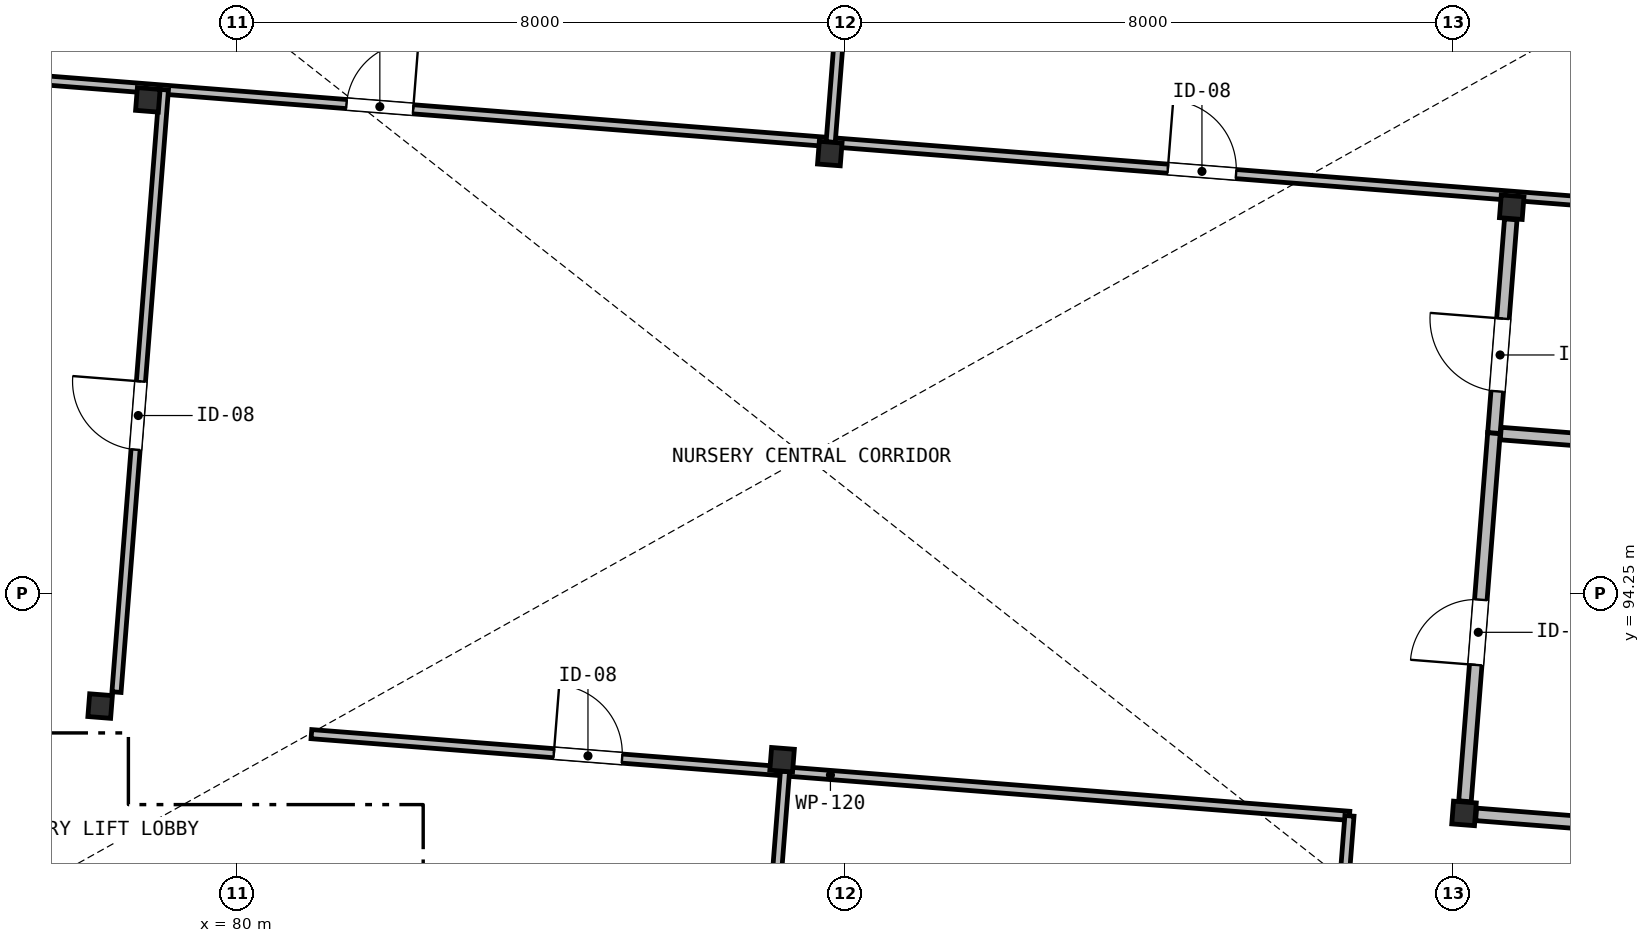
"""IFC4 building model, lengths in metres.
Left out: names, types, materials, properties, quantities, classifications, styles, units other than length and angle.
Written with IfcOpenShell. Run it as: python <this file> out.ifc"""

import sys

from ifc_helpers import new_model, si_unit, direction, frame, frame_2d, origin, origin_2d, place, context, subcontext, project, spatial, rectangle, hollow_rectangle, extrude, element, fill, save


model = new_model("IFC4")
c1 = context("Model", 3, precision=1e-05, world=origin(), true_north=direction((0.0, 1.0)))
c2 = subcontext(c1, "Body", "Model", "MODEL_VIEW")
j1 = project(units=[si_unit("LENGTHUNIT", "METRE"), si_unit("PLANEANGLEUNIT", "RADIAN")], contexts=[c1])
p1 = place(None, origin())
s1 = spatial("IfcSite", under=j1, at=p1, CompositionType="ELEMENT")
p2 = place(p1, origin())
s2 = spatial("IfcBuilding", under=s1, at=p2, CompositionType="ELEMENT")
p3 = place(p2, origin())
s3 = spatial("IfcBuildingStorey", under=s2, at=p3, CompositionType="ELEMENT", Elevation=0.0)
for number, where, z_axis, x_axis in (
    (1, (78.2, 92.769, -0.35), (0.0, 0.0, 1.0), (0.997, -0.078, 0.0)),
    (2, (78.828, 100.745, -0.35), (0.0, 0.0, 1.0), (0.997, -0.078, 0.0)),
    (3, (87.172, 92.063, -0.35), (0.0, 0.0, 1.0), (0.997, -0.078, 0.0)),
    (4, (87.8, 100.038, -0.35), (0.0, 0.0, 1.0), (0.997, -0.078, 0.0)),
    (5, (96.145, 91.357, -0.35), (0.0, 0.0, 1.0), (0.997, -0.078, 0.0)),
    (6, (96.772, 99.332, -0.35), (0.0, 0.0, 1.0), (0.997, -0.078, 0.0)),
):
    element("IfcColumn", number, at=place(p3, frame(where, z_axis=z_axis, x_axis=x_axis)), inside=s3, PredefinedType="COLUMN", context=c2, shape_type="SweptSolid", body=[
        extrude(hollow_rectangle(XDim=0.3, YDim=0.3, WallThickness=0.016, at=origin_2d()), origin(), (0.0, 0.0, 1.0), 4.85),
    ])
p4 = place(p3, frame((80.979, 92.4, 0.0), z_axis=(0.0, 0.0, 1.0), x_axis=(0.996918352409, -0.078446151144, 0.0)))
e7 = element("IfcWall", 7, at=p4, inside=s3, PredefinedType="PARTITIONING", context=c2, shape_type="SweptSolid", body=[
    extrude(rectangle(XDim=13.7, YDim=0.12, at=frame_2d((6.85, 0.0))), origin(), (0.0, 0.0, 1.0), 3.844),
])
p5 = place(p4, frame((3.2, 0.0, 0.0)))
e8 = element("IfcOpeningElement", 8, at=p5, cuts=e7, PredefinedType="OPENING", context=c2, shape_type="SweptSolid", body=[
    extrude(rectangle(XDim=0.9, YDim=2.1, at=frame_2d((0.45, 1.05))), frame((0.0, 0.075, 0.0), z_axis=(0.0, -1.0, 0.0), x_axis=(1.0, 0.0, 0.0)), (0.0, 0.0, 1.0), 0.15),
])
p6 = place(p3, frame((94.033, 83.649, 0.0), z_axis=(0.0, 0.0, 1.0), x_axis=(0.078442108986, 0.996918670473, 0.0)))
e9 = element("IfcWall", 9, at=p6, inside=s3, PredefinedType="PARTITIONING", context=c2, shape_type="SweptSolid", body=[
    extrude(rectangle(XDim=7.7, YDim=0.12, at=frame_2d((3.85, 0.0))), origin(), (0.0, 0.0, 1.0), 4.23),
])
p7 = place(p3, frame((70.027, 101.588, 0.0), z_axis=(0.0, 0.0, 1.0), x_axis=(0.996917529869, -0.078456603549, 0.0)))
e10 = element("IfcWall", 10, at=p7, inside=s3, PredefinedType="PARTITIONING", context=c2, shape_type="SweptSolid", body=[
    extrude(rectangle(XDim=17.84, YDim=0.12, at=frame_2d((8.92, 0.0))), origin(), (0.0, 0.0, 1.0), 3.844),
])
p8 = place(p7, frame((11.45, 0.0, 0.0)))
e11 = element("IfcOpeningElement", 11, at=p8, cuts=e10, PredefinedType="OPENING", context=c2, shape_type="SweptSolid", body=[
    extrude(rectangle(XDim=0.88, YDim=2.1, at=frame_2d((0.44, 1.05))), frame((0.0, 0.075, 0.0), z_axis=(0.0, -1.0, 0.0), x_axis=(1.0, 0.0, 0.0)), (0.0, 0.0, 1.0), 0.15),
])
p9 = place(p3, frame((87.812, 100.188, 0.0), z_axis=(0.0, 0.0, 1.0), x_axis=(0.996917614105, -0.078455533188, 0.0)))
e12 = element("IfcWall", 12, at=p9, inside=s3, PredefinedType="PARTITIONING", context=c2, shape_type="SweptSolid", body=[
    extrude(rectangle(XDim=17.84, YDim=0.12, at=frame_2d((8.92, 0.0))), origin(), (0.0, 0.0, 1.0), 3.844),
])
p10 = place(p9, frame((4.45, 0.0, 0.0)))
e13 = element("IfcOpeningElement", 13, at=p10, cuts=e12, PredefinedType="OPENING", context=c2, shape_type="SweptSolid", body=[
    extrude(rectangle(XDim=0.9, YDim=2.1, at=frame_2d((0.45, 1.05))), frame((0.0, 0.075, 0.0), z_axis=(0.0, -1.0, 0.0), x_axis=(1.0, 0.0, 0.0)), (0.0, 0.0, 1.0), 0.15),
])
p11 = place(p3, frame((78.415, 92.953, 0.0), z_axis=(0.0, 0.0, 1.0), x_axis=(0.078462345875, 0.996917077936, 0.0)))
e14 = element("IfcWall", 14, at=p11, inside=s3, PredefinedType="PARTITIONING", context=c2, shape_type="SweptSolid", body=[
    extrude(rectangle(XDim=7.95, YDim=0.12, at=frame_2d((3.975, 0.0))), origin(), (0.0, 0.0, 1.0), 3.844),
])
p12 = place(p11, frame((3.2, 0.0, 0.0)))
e15 = element("IfcOpeningElement", 15, at=p12, cuts=e14, PredefinedType="OPENING", context=c2, shape_type="SweptSolid", body=[
    extrude(rectangle(XDim=0.9, YDim=2.1, at=frame_2d((0.45, 1.05))), frame((0.0, 0.075, 0.0), z_axis=(0.0, -1.0, 0.0), x_axis=(1.0, 0.0, 0.0)), (0.0, 0.0, 1.0), 0.15),
])
p13 = place(p3, frame((96.304, 91.344, 0.0), z_axis=(0.0, 0.0, 1.0), x_axis=(0.9969162409, -0.078472980254, 0.0)))
e16 = element("IfcWall", 16, at=p13, inside=s3, PredefinedType="PLUMBINGWALL", context=c2, shape_type="SweptSolid", body=[
    extrude(rectangle(XDim=8.68, YDim=0.165, at=frame_2d((4.34, 0.0))), origin(), (0.0, 0.0, 1.0), 3.844),
])
p14 = place(p3, frame((96.157, 91.516, 0.0), z_axis=(0.0, 0.0, 1.0), x_axis=(0.078463385465, 0.996916996114, 0.0)))
e17 = element("IfcWall", 17, at=p14, inside=s3, PredefinedType="PLUMBINGWALL", context=c2, shape_type="SweptSolid", body=[
    extrude(rectangle(XDim=4.86, YDim=0.165, at=frame_2d((2.43, 0.0))), origin(), (0.0, 0.0, 1.0), 3.844),
])
p15 = place(p14, frame((1.8, 0.0, 0.0)))
e18 = element("IfcOpeningElement", 18, at=p15, cuts=e17, PredefinedType="OPENING", context=c2, shape_type="SweptSolid", body=[
    extrude(rectangle(XDim=0.86, YDim=2.1, at=frame_2d((0.43, 1.05))), frame((0.0, 0.097, 0.0), z_axis=(0.0, -1.0, 0.0), x_axis=(1.0, 0.0, 0.0)), (0.0, 0.0, 1.0), 0.195),
])
p16 = place(p3, frame((96.538, 96.362, 0.0), z_axis=(0.0, 0.0, 1.0), x_axis=(0.078437571766, 0.996919027472, 0.0)))
e19 = element("IfcWall", 19, at=p16, inside=s3, PredefinedType="PLUMBINGWALL", context=c2, shape_type="SweptSolid", body=[
    extrude(rectangle(XDim=2.82, YDim=0.165, at=frame_2d((1.41, 0.0))), origin(), (0.0, 0.0, 1.0), 3.844),
])
p17 = place(p16, frame((0.55, 0.0, 0.0)))
e20 = element("IfcOpeningElement", 20, at=p17, cuts=e19, PredefinedType="OPENING", context=c2, shape_type="SweptSolid", body=[
    extrude(rectangle(XDim=0.96, YDim=2.12, at=frame_2d((0.48, 1.06))), frame((0.0, 0.097, 0.0), z_axis=(0.0, -1.0, 0.0), x_axis=(1.0, 0.0, 0.0)), (0.0, 0.0, 1.0), 0.195),
])
p18 = place(p3, frame((87.812, 100.188, 0.0), z_axis=(0.0, 0.0, 1.0), x_axis=(0.078462944011, 0.996917030859, 0.0)))
e21 = element("IfcWall", 21, at=p18, inside=s3, PredefinedType="PARTITIONING", context=c2, shape_type="SweptSolid", body=[
    extrude(rectangle(XDim=7.81, YDim=0.12, at=frame_2d((3.905, 0.0))), origin(), (0.0, 0.0, 1.0), 3.844),
])
p19 = place(p3, frame((96.628, 96.354, 0.0), z_axis=(0.0, 0.0, 1.0), x_axis=(0.996916420474, -0.078470698917, 0.0)))
e22 = element("IfcWall", 22, at=p19, inside=s3, PredefinedType="PLUMBINGWALL", context=c2, shape_type="SweptSolid", body=[
    extrude(rectangle(XDim=8.87, YDim=0.165, at=frame_2d((4.435, 0.0))), origin(), (0.0, 0.0, 1.0), 4.23),
])
p20 = place(p3, frame((86.606, 84.233, 0.0), z_axis=(0.0, 0.0, 1.0), x_axis=(0.078442108986, 0.996918670473, 0.0)))
e23 = element("IfcWall", 23, at=p20, inside=s3, PredefinedType="PARTITIONING", context=c2, shape_type="SweptSolid", body=[
    extrude(rectangle(XDim=7.7, YDim=0.12, at=frame_2d((3.85, 0.0))), origin(), (0.0, 0.0, 1.0), 3.844),
])
p21 = place(p20, frame((3.5, 0.0, 0.0)))
e24 = element("IfcOpeningElement", 24, at=p21, cuts=e23, PredefinedType="OPENING", context=c2, shape_type="SweptSolid", body=[
    extrude(rectangle(XDim=0.9, YDim=2.1, at=frame_2d((0.45, 1.05))), frame((0.0, 0.075, 0.0), z_axis=(0.0, -1.0, 0.0), x_axis=(1.0, 0.0, 0.0)), (0.0, 0.0, 1.0), 0.15),
])
p22 = place(p5, origin())
e25 = element("IfcDoor", 25, at=p22, inside=s3, OperationType="SINGLE_SWING_LEFT", PredefinedType="DOOR", context=c2, shape_type="SweptSolid", body=[
    extrude(rectangle(XDim=0.9, YDim=2.1, at=frame_2d((0.45, 1.05))), frame((0.0, 0.025, 0.0), z_axis=(0.0, -1.0, 0.0), x_axis=(1.0, 0.0, 0.0)), (0.0, 0.0, 1.0), 0.05),
])
fill(e8, e25)
p23 = place(p8, origin())
e26 = element("IfcDoor", 26, at=p23, inside=s3, OperationType="SINGLE_SWING_RIGHT", PredefinedType="DOOR", context=c2, shape_type="SweptSolid", body=[
    extrude(rectangle(XDim=0.88, YDim=2.1, at=frame_2d((0.44, 1.05))), frame((0.0, 0.025, 0.0), z_axis=(0.0, -1.0, 0.0), x_axis=(1.0, 0.0, 0.0)), (0.0, 0.0, 1.0), 0.05),
])
fill(e11, e26)
p24 = place(p10, origin())
e27 = element("IfcDoor", 27, at=p24, inside=s3, OperationType="SINGLE_SWING_LEFT", PredefinedType="DOOR", context=c2, shape_type="SweptSolid", body=[
    extrude(rectangle(XDim=0.9, YDim=2.1, at=frame_2d((0.45, 1.05))), frame((0.0, 0.025, 0.0), z_axis=(0.0, -1.0, 0.0), x_axis=(1.0, 0.0, 0.0)), (0.0, 0.0, 1.0), 0.05),
])
fill(e13, e27)
p25 = place(p12, origin())
e28 = element("IfcDoor", 28, at=p25, inside=s3, OperationType="SINGLE_SWING_RIGHT", PredefinedType="DOOR", context=c2, shape_type="SweptSolid", body=[
    extrude(rectangle(XDim=0.9, YDim=2.1, at=frame_2d((0.45, 1.05))), frame((0.0, 0.025, 0.0), z_axis=(0.0, -1.0, 0.0), x_axis=(1.0, 0.0, 0.0)), (0.0, 0.0, 1.0), 0.05),
])
fill(e15, e28)
p26 = place(p15, origin())
e29 = element("IfcDoor", 29, at=p26, inside=s3, OperationType="SINGLE_SWING_LEFT", PredefinedType="DOOR", context=c2, shape_type="SweptSolid", body=[
    extrude(rectangle(XDim=0.86, YDim=2.1, at=frame_2d((0.43, 1.05))), frame((0.0, 0.025, 0.0), z_axis=(0.0, -1.0, 0.0), x_axis=(1.0, 0.0, 0.0)), (0.0, 0.0, 1.0), 0.05),
])
fill(e18, e29)
p27 = place(p17, origin())
e30 = element("IfcDoor", 30, at=p27, inside=s3, OperationType="SINGLE_SWING_RIGHT", PredefinedType="DOOR", context=c2, shape_type="SweptSolid", body=[
    extrude(rectangle(XDim=0.96, YDim=2.12, at=frame_2d((0.48, 1.06))), frame((0.0, 0.025, 0.0), z_axis=(0.0, -1.0, 0.0), x_axis=(1.0, 0.0, 0.0)), (0.0, 0.0, 1.0), 0.05),
])
fill(e20, e30)
save(model, sys.argv[1])
